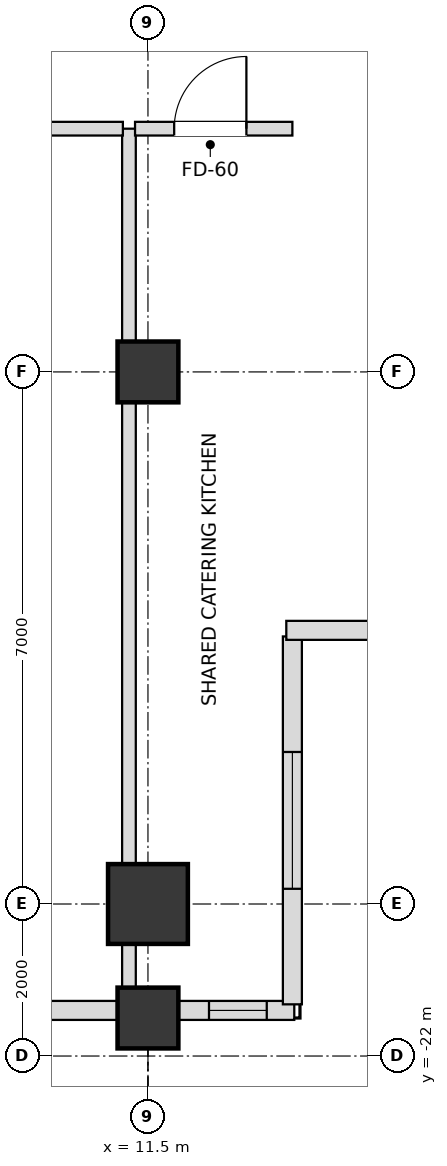
"""IFC4 building model, lengths in metres.
Left out: names, types, materials, properties, quantities, classifications, styles, units other than length and angle.
Written with IfcOpenShell. Run it as: python <this file> out.ifc"""

import sys

from ifc_helpers import new_model, si_unit, direction, frame, frame_2d, origin, origin_2d, place, context, subcontext, project, spatial, rectangle, extrude, element, fill, save


model = new_model("IFC4")
c1 = context("Model", 3, precision=1e-05, world=origin(), true_north=direction((0.0, 1.0)))
c2 = subcontext(c1, "Body", "Model", "MODEL_VIEW")
j1 = project(units=[si_unit("LENGTHUNIT", "METRE"), si_unit("PLANEANGLEUNIT", "RADIAN")], contexts=[c1])
p1 = place(None, origin())
s1 = spatial("IfcSite", under=j1, at=p1, CompositionType="ELEMENT")
p2 = place(p1, origin())
s2 = spatial("IfcBuilding", under=s1, at=p2, CompositionType="ELEMENT")
p3 = place(p2, frame((0.0, 0.0, 208.8)))
s3 = spatial("IfcBuildingStorey", under=s2, at=p3, CompositionType="ELEMENT", Elevation=208.8)
p4 = place(p3, frame((11.5, -20.0, 0.0), z_axis=(0.0, 0.0, 1.0), x_axis=(1.0, 0.0, 0.0)))
e1 = element("IfcColumn", 1, at=p4, inside=s3, PredefinedType="USERDEFINED", context=c2, shape_type="SweptSolid", body=[
    extrude(rectangle(XDim=1.05, YDim=1.05, at=origin_2d()), origin(), (0.0, 0.0, 1.0), 3.6),
])
for number, where, z_axis, x_axis in (
    (2, (11.5, -13.0, 0.0), (0.0, 0.0, 1.0), (1.0, 0.0, 0.0)),
    (3, (11.5, -21.5, 0.0), (0.0, 0.0, 1.0), (1.0, 0.0, 0.0)),
):
    element("IfcColumn", number, at=place(p3, frame(where, z_axis=z_axis, x_axis=x_axis)), inside=s3, PredefinedType="COLUMN", context=c2, shape_type="SweptSolid", body=[
        extrude(rectangle(XDim=0.8, YDim=0.8, at=origin_2d()), origin(), (0.0, 0.0, 1.0), 3.6),
    ])
p5 = place(p3, frame((6.895, -21.4, 0.0), z_axis=(0.0, 0.0, 1.0), x_axis=(1.0, 0.0, 0.0)))
e4 = element("IfcWall", 4, at=p5, inside=s3, PredefinedType="SOLIDWALL", context=c2, shape_type="SweptSolid", body=[
    extrude(rectangle(XDim=4.21, YDim=0.25, at=frame_2d((2.105, 0.0))), origin(), (0.0, 0.0, 1.0), 2.59),
])
p6 = place(p5, frame((1.205, 0.0, 0.72)))
e5 = element("IfcOpeningElement", 5, at=p6, cuts=e4, PredefinedType="OPENING", context=c2, shape_type="SweptSolid", body=[
    extrude(rectangle(XDim=1.8, YDim=1.68, at=frame_2d((0.9, 0.84))), frame((0.0, 0.135, 0.0), z_axis=(0.0, -1.0, 0.0), x_axis=(1.0, 0.0, 0.0)), (0.0, 0.0, 1.0), 0.27),
])
p7 = place(p3, frame((11.895, -21.4, 0.0), z_axis=(0.0, 0.0, 1.0), x_axis=(1.0, 0.0, 0.0)))
e6 = element("IfcWall", 6, at=p7, inside=s3, PredefinedType="SOLIDWALL", context=c2, shape_type="SweptSolid", body=[
    extrude(rectangle(XDim=1.53, YDim=0.25, at=frame_2d((0.765, 0.0))), origin(), (0.0, 0.0, 1.0), 2.59),
])
p8 = place(p7, frame((0.408, 0.0, 0.72)))
e7 = element("IfcOpeningElement", 7, at=p8, cuts=e6, PredefinedType="OPENING", context=c2, shape_type="SweptSolid", body=[
    extrude(rectangle(XDim=0.76, YDim=1.68, at=frame_2d((0.38, 0.84))), frame((0.0, 0.135, 0.0), z_axis=(0.0, -1.0, 0.0), x_axis=(1.0, 0.0, 0.0)), (0.0, 0.0, 1.0), 0.27),
])
p9 = place(p3, frame((13.4, -21.32, 0.0), z_axis=(0.0, 0.0, 1.0), x_axis=(0.0, 1.0, 0.0)))
e8 = element("IfcWall", 8, at=p9, inside=s3, PredefinedType="SOLIDWALL", context=c2, shape_type="SweptSolid", body=[
    extrude(rectangle(XDim=4.84, YDim=0.25, at=frame_2d((2.42, 0.0))), origin(), (0.0, 0.0, 1.0), 2.59),
])
p10 = place(p9, frame((1.52, 0.0, 0.72)))
e9 = element("IfcOpeningElement", 9, at=p10, cuts=e8, PredefinedType="OPENING", context=c2, shape_type="SweptSolid", body=[
    extrude(rectangle(XDim=1.8, YDim=1.68, at=frame_2d((0.9, 0.84))), frame((0.0, 0.135, 0.0), z_axis=(0.0, -1.0, 0.0), x_axis=(1.0, 0.0, 0.0)), (0.0, 0.0, 1.0), 0.27),
])
p11 = place(p3, frame((13.32, -16.4, 0.0), z_axis=(0.0, 0.0, 1.0), x_axis=(1.0, 0.0, 0.0)))
e10 = element("IfcWall", 10, at=p11, inside=s3, PredefinedType="SOLIDWALL", context=c2, shape_type="SweptSolid", body=[
    extrude(rectangle(XDim=5.16, YDim=0.25, at=frame_2d((2.58, 0.0))), origin(), (0.0, 0.0, 1.0), 2.59),
])
p12 = place(p11, frame((1.68, 0.0, 0.72)))
e11 = element("IfcOpeningElement", 11, at=p12, cuts=e10, PredefinedType="OPENING", context=c2, shape_type="SweptSolid", body=[
    extrude(rectangle(XDim=1.8, YDim=1.68, at=frame_2d((0.9, 0.84))), frame((0.0, 0.135, 0.0), z_axis=(0.0, -1.0, 0.0), x_axis=(1.0, 0.0, 0.0)), (0.0, 0.0, 1.0), 0.27),
])
p13 = place(p3, frame((11.25, -21.4, 0.0), z_axis=(0.0, 0.0, 1.0), x_axis=(0.0, 1.0, 0.0)))
e12 = element("IfcWall", 12, at=p13, inside=s3, PredefinedType="PARTITIONING", context=c2, shape_type="SweptSolid", body=[
    extrude(rectangle(XDim=11.6, YDim=0.18, at=frame_2d((5.8, 0.0))), origin(), (0.0, 0.0, 1.0), 2.59),
])
p14 = place(p3, frame((4.93, -9.8, 0.0), z_axis=(0.0, 0.0, 1.0), x_axis=(1.0, 0.0, 0.0)))
e13 = element("IfcWall", 13, at=p14, inside=s3, PredefinedType="PARTITIONING", context=c2, shape_type="SweptSolid", body=[
    extrude(rectangle(XDim=6.24, YDim=0.18, at=frame_2d((3.12, 0.0))), origin(), (0.0, 0.0, 1.0), 2.746),
])
p15 = place(p14, frame((2.645, 0.0, 0.0)))
e14 = element("IfcOpeningElement", 14, at=p15, cuts=e13, PredefinedType="OPENING", context=c2, shape_type="SweptSolid", body=[
    extrude(rectangle(XDim=0.95, YDim=2.15, at=frame_2d((0.475, 1.075))), frame((0.0, 0.1, 0.0), z_axis=(0.0, -1.0, 0.0), x_axis=(1.0, 0.0, 0.0)), (0.0, 0.0, 1.0), 0.2),
])
p16 = place(p3, frame((11.33, -9.8, 0.0), z_axis=(0.0, 0.0, 1.0), x_axis=(1.0, 0.0, 0.0)))
e15 = element("IfcWall", 15, at=p16, inside=s3, PredefinedType="PARTITIONING", context=c2, shape_type="SweptSolid", body=[
    extrude(rectangle(XDim=2.07, YDim=0.18, at=frame_2d((1.035, 0.0))), origin(), (0.0, 0.0, 1.0), 3.3),
])
p17 = place(p16, frame((0.515, 0.0, 0.0)))
e16 = element("IfcOpeningElement", 16, at=p17, cuts=e15, PredefinedType="OPENING", context=c2, shape_type="SweptSolid", body=[
    extrude(rectangle(XDim=0.95, YDim=2.15, at=frame_2d((0.475, 1.075))), frame((0.0, 0.1, 0.0), z_axis=(0.0, -1.0, 0.0), x_axis=(1.0, 0.0, 0.0)), (0.0, 0.0, 1.0), 0.2),
])
p18 = place(p8, origin())
e17 = element("IfcWindow", 17, at=p18, inside=s3, PartitioningType="SINGLE_PANEL", PredefinedType="WINDOW", context=c2, shape_type="SweptSolid", body=[
    extrude(rectangle(XDim=0.76, YDim=1.68, at=frame_2d((0.38, 0.84))), frame((0.0, 0.03, 0.0), z_axis=(0.0, -1.0, 0.0), x_axis=(1.0, 0.0, 0.0)), (0.0, 0.0, 1.0), 0.06),
])
fill(e7, e17)
p19 = place(p10, origin())
e18 = element("IfcWindow", 18, at=p19, inside=s3, PartitioningType="SINGLE_PANEL", PredefinedType="WINDOW", context=c2, shape_type="SweptSolid", body=[
    extrude(rectangle(XDim=1.8, YDim=1.68, at=frame_2d((0.9, 0.84))), frame((0.0, 0.03, 0.0), z_axis=(0.0, -1.0, 0.0), x_axis=(1.0, 0.0, 0.0)), (0.0, 0.0, 1.0), 0.06),
])
fill(e9, e18)
p20 = place(p17, origin())
e19 = element("IfcDoor", 19, at=p20, inside=s3, OperationType="SINGLE_SWING_RIGHT", PredefinedType="DOOR", context=c2, shape_type="SweptSolid", body=[
    extrude(rectangle(XDim=0.95, YDim=2.15, at=frame_2d((0.475, 1.075))), frame((0.0, 0.025, 0.0), z_axis=(0.0, -1.0, 0.0), x_axis=(1.0, 0.0, 0.0)), (0.0, 0.0, 1.0), 0.05),
])
fill(e16, e19)
save(model, sys.argv[1])
